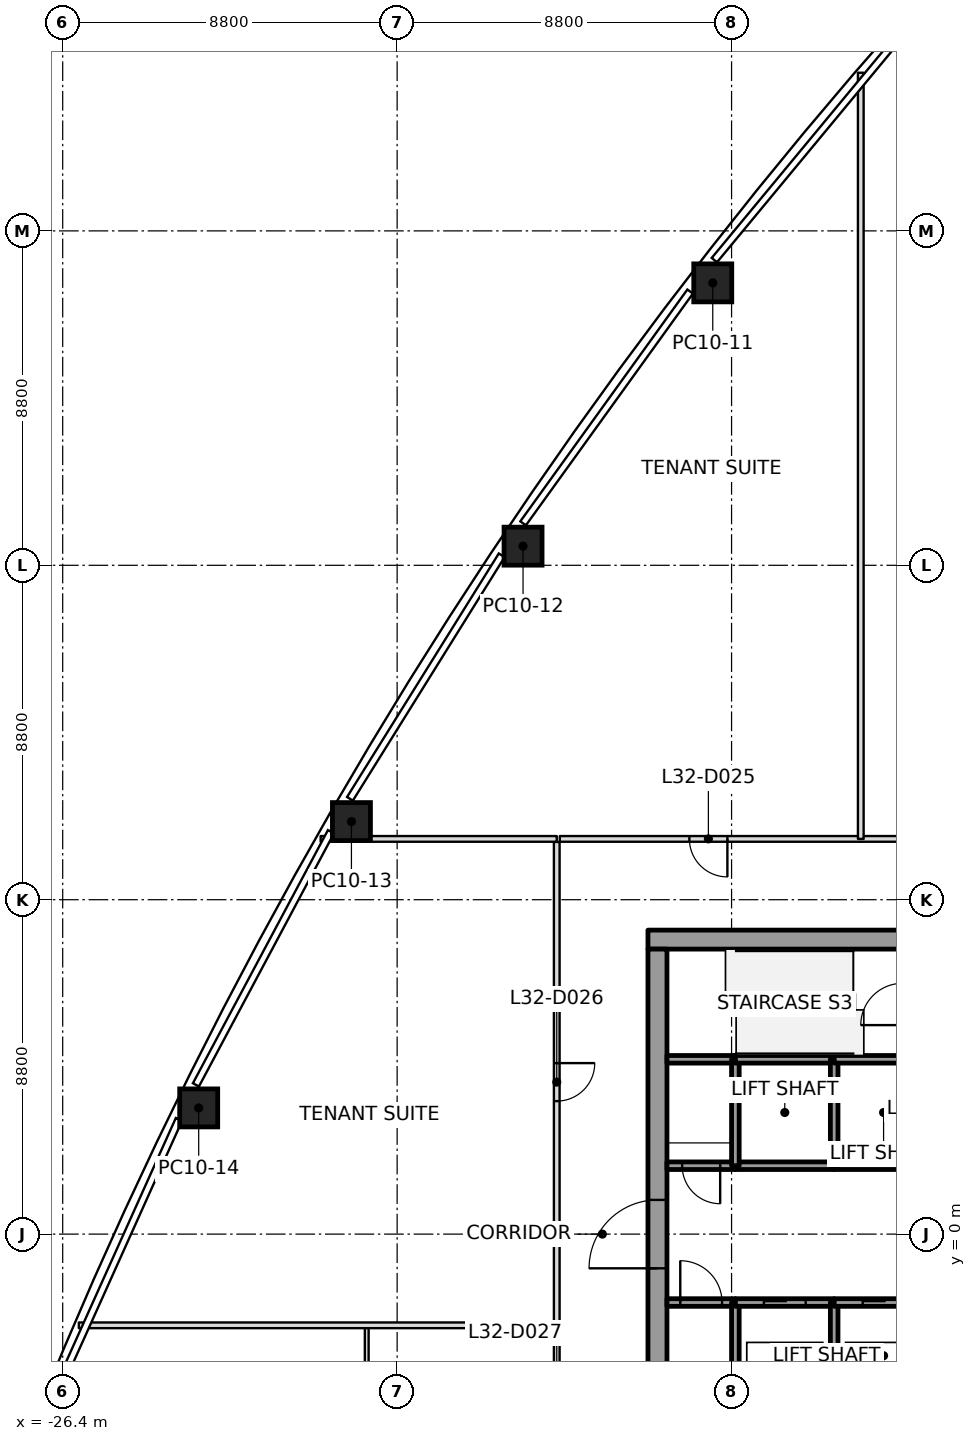
"""IFC4 building model, lengths in metres.
Left out: names, types, materials, properties, quantities, classifications, styles, units other than length and angle.
Written with IfcOpenShell. Run it as: python <this file> out.ifc"""

import sys

from ifc_helpers import new_model, si_unit, direction, frame, frame_2d, origin, origin_2d, place, context, subcontext, project, spatial, rectangle, extrude, element, fill, save


model = new_model("IFC4")
c1 = context("Model", 3, precision=1e-05, world=origin(), true_north=direction((0.0, 1.0)))
c2 = subcontext(c1, "Body", "Model", "MODEL_VIEW")
j1 = project(units=[si_unit("LENGTHUNIT", "METRE"), si_unit("PLANEANGLEUNIT", "RADIAN")], contexts=[c1])
p1 = place(None, origin())
s1 = spatial("IfcSite", under=j1, at=p1, CompositionType="ELEMENT")
p2 = place(p1, origin())
s2 = spatial("IfcBuilding", under=s1, at=p2, CompositionType="ELEMENT")
p3 = place(p2, frame((0.0, 0.0, 149.8)))
s3 = spatial("IfcBuildingStorey", under=s2, at=p3, CompositionType="ELEMENT", Elevation=149.8)
p4 = place(p3, frame((-9.295, 25.032, 0.0), z_axis=(0.000244088989, -0.020564497316, 0.999788498569), x_axis=(0.611500783667, 0.791079555374, 0.016122302675)))
e1 = element("IfcColumn", 1, at=p4, inside=s3, PredefinedType="COLUMN", context=c2, shape_type="SweptSolid", body=[
    extrude(rectangle(XDim=1.0, YDim=1.0, at=origin_2d()), origin(), (0.0, 0.0, 1.0), 4.001),
])
p5 = place(p3, frame((-14.287, 18.104, 0.0), z_axis=(0.005248490815, -0.013243284963, 0.999898529226), x_axis=(0.556999856926, 0.830473325265, 0.008075605706)))
e2 = element("IfcColumn", 2, at=p5, inside=s3, PredefinedType="COLUMN", context=c2, shape_type="SweptSolid", body=[
    extrude(rectangle(XDim=1.0, YDim=1.0, at=origin_2d()), origin(), (0.0, 0.0, 1.0), 4.0),
])
p6 = place(p3, frame((-18.802, 10.856, 0.0), z_axis=(0.009826027463, -0.005675904062, 0.999935614576), x_axis=(0.499975861713, 0.866039339578, 2.779837e-06)))
e3 = element("IfcColumn", 3, at=p6, inside=s3, PredefinedType="COLUMN", context=c2, shape_type="SweptSolid", body=[
    extrude(rectangle(XDim=1.0, YDim=1.0, at=origin_2d()), origin(), (0.0, 0.0, 1.0), 4.0),
])
p7 = place(p3, frame((-22.822, 3.321, 0.0), z_axis=(0.014097689605, 0.002074984617, 0.999898469639), x_axis=(0.440692979973, 0.897621564819, -0.008076123754)))
e4 = element("IfcColumn", 4, at=p7, inside=s3, PredefinedType="COLUMN", context=c2, shape_type="SweptSolid", body=[
    extrude(rectangle(XDim=1.0, YDim=1.0, at=origin_2d()), origin(), (0.0, 0.0, 1.0), 4.0),
])
p8 = place(p3, frame((-11.0, 7.75, 0.0), z_axis=(0.0, 0.0, 1.0), x_axis=(1.0, 0.0, 0.0)))
e5 = element("IfcWall", 5, at=p8, inside=s3, PredefinedType="SHEAR", context=c2, shape_type="SweptSolid", body=[
    extrude(rectangle(XDim=22.0, YDim=0.5, at=frame_2d((11.0, 0.0))), origin(), (0.0, 0.0, 1.0), 4.0),
])
p9 = place(p8, frame((10.45, 0.0, 0.0)))
e6 = element("IfcOpeningElement", 6, at=p9, cuts=e5, PredefinedType="OPENING", context=c2, shape_type="SweptSolid", body=[
    extrude(rectangle(XDim=1.1, YDim=2.1, at=frame_2d((0.55, 1.05))), frame((0.0, 0.25, 0.0), z_axis=(0.0, -1.0, 0.0), x_axis=(1.0, 0.0, 0.0)), (0.0, 0.0, 1.0), 0.5),
])
p10 = place(p3, frame((-10.75, -7.5, 0.0), z_axis=(0.0, 0.0, 1.0), x_axis=(0.0, 1.0, 0.0)))
e7 = element("IfcWall", 7, at=p10, inside=s3, PredefinedType="SHEAR", context=c2, shape_type="SweptSolid", body=[
    extrude(rectangle(XDim=15.0, YDim=0.5, at=frame_2d((7.5, 0.0))), origin(), (0.0, 0.0, 1.0), 4.0),
])
p11 = place(p10, frame((6.6, 0.0, 0.0)))
e8 = element("IfcOpeningElement", 8, at=p11, cuts=e7, PredefinedType="OPENING", context=c2, shape_type="SweptSolid", body=[
    extrude(rectangle(XDim=1.8, YDim=2.1, at=frame_2d((0.9, 1.05))), frame((0.0, 0.25, 0.0), z_axis=(0.0, -1.0, 0.0), x_axis=(1.0, 0.0, 0.0)), (0.0, 0.0, 1.0), 0.5),
])
p12 = place(p3, frame((-10.5, -1.8, 0.0), z_axis=(0.0, 0.0, 1.0), x_axis=(1.0, 0.0, 0.0)))
e9 = element("IfcWall", 9, at=p12, inside=s3, PredefinedType="SOLIDWALL", context=c2, shape_type="SweptSolid", body=[
    extrude(rectangle(XDim=1.8, YDim=0.2, at=frame_2d((0.9, 0.0))), origin(), (0.0, 0.0, 1.0), 3.85),
])
p13 = place(p12, frame((0.35, 0.0, 0.0)))
e10 = element("IfcOpeningElement", 10, at=p13, cuts=e9, PredefinedType="OPENING", context=c2, shape_type="SweptSolid", body=[
    extrude(rectangle(XDim=1.1, YDim=2.1, at=frame_2d((0.55, 1.05))), frame((0.0, 0.1, 0.0), z_axis=(0.0, -1.0, 0.0), x_axis=(1.0, 0.0, 0.0)), (0.0, 0.0, 1.0), 0.2),
])
p14 = place(p3, frame((-8.7, 1.8, 0.0), z_axis=(0.0, 0.0, 1.0), x_axis=(-1.0, 0.0, 0.0)))
e11 = element("IfcWall", 11, at=p14, inside=s3, PredefinedType="SOLIDWALL", context=c2, shape_type="SweptSolid", body=[
    extrude(rectangle(XDim=1.8, YDim=0.2, at=frame_2d((0.9, 0.0))), origin(), (0.0, 0.0, 1.0), 3.85),
])
p15 = place(p14, frame((0.4, 0.0, 0.0)))
e12 = element("IfcOpeningElement", 12, at=p15, cuts=e11, PredefinedType="OPENING", context=c2, shape_type="SweptSolid", body=[
    extrude(rectangle(XDim=1.0, YDim=2.1, at=frame_2d((0.5, 1.05))), frame((0.0, 0.1, 0.0), z_axis=(0.0, -1.0, 0.0), x_axis=(1.0, 0.0, 0.0)), (0.0, 0.0, 1.0), 0.2),
])
p16 = place(p3, frame((-8.7, 4.6, 0.0), z_axis=(0.0, 0.0, 1.0), x_axis=(-1.0, 0.0, 0.0)))
e13 = element("IfcWall", 13, at=p16, inside=s3, PredefinedType="SOLIDWALL", context=c2, shape_type="SweptSolid", body=[
    extrude(rectangle(XDim=1.8, YDim=0.2, at=frame_2d((0.9, 0.0))), origin(), (0.0, 0.0, 1.0), 3.85),
])
p17 = place(p3, frame((-8.7, -4.6, 0.0), z_axis=(0.0, 0.0, 1.0), x_axis=(0.0, 1.0, 0.0)))
e14 = element("IfcWall", 14, at=p17, inside=s3, PredefinedType="SOLIDWALL", context=c2, shape_type="SweptSolid", body=[
    extrude(rectangle(XDim=2.8, YDim=0.2, at=frame_2d((1.4, 0.0))), origin(), (0.0, 0.0, 1.0), 3.85),
])
p18 = place(p3, frame((-8.7, -1.8, 0.0), z_axis=(0.0, 0.0, 1.0), x_axis=(1.0, 0.0, 0.0)))
e15 = element("IfcWall", 15, at=p18, inside=s3, PredefinedType="SOLIDWALL", context=c2, shape_type="SweptSolid", body=[
    extrude(rectangle(XDim=2.6, YDim=0.2, at=frame_2d((1.3, 0.0))), origin(), (0.0, 0.0, 1.0), 3.85),
])
p19 = place(p18, frame((0.75, 0.0, 0.0)))
e16 = element("IfcOpeningElement", 16, at=p19, cuts=e15, PredefinedType="OPENING", context=c2, shape_type="SweptSolid", body=[
    extrude(rectangle(XDim=1.1, YDim=2.1, at=frame_2d((0.55, 1.05))), frame((0.0, 0.1, 0.0), z_axis=(0.0, -1.0, 0.0), x_axis=(1.0, 0.0, 0.0)), (0.0, 0.0, 1.0), 0.2),
])
p20 = place(p3, frame((-6.1, 1.8, 0.0), z_axis=(0.0, 0.0, 1.0), x_axis=(-1.0, 0.0, 0.0)))
e17 = element("IfcWall", 17, at=p20, inside=s3, PredefinedType="SOLIDWALL", context=c2, shape_type="SweptSolid", body=[
    extrude(rectangle(XDim=2.6, YDim=0.2, at=frame_2d((1.3, 0.0))), origin(), (0.0, 0.0, 1.0), 3.85),
])
p21 = place(p3, frame((-8.7, 1.8, 0.0), z_axis=(0.0, 0.0, 1.0), x_axis=(0.0, 1.0, 0.0)))
e18 = element("IfcWall", 18, at=p21, inside=s3, PredefinedType="SOLIDWALL", context=c2, shape_type="SweptSolid", body=[
    extrude(rectangle(XDim=2.8, YDim=0.2, at=frame_2d((1.4, 0.0))), origin(), (0.0, 0.0, 1.0), 3.85),
])
p22 = place(p3, frame((-6.1, 4.6, 0.0), z_axis=(0.0, 0.0, 1.0), x_axis=(-1.0, 0.0, 0.0)))
e19 = element("IfcWall", 19, at=p22, inside=s3, PredefinedType="SOLIDWALL", context=c2, shape_type="SweptSolid", body=[
    extrude(rectangle(XDim=2.6, YDim=0.2, at=frame_2d((1.3, 0.0))), origin(), (0.0, 0.0, 1.0), 3.85),
])
p23 = place(p3, frame((-6.1, -4.6, 0.0), z_axis=(0.0, 0.0, 1.0), x_axis=(0.0, 1.0, 0.0)))
e20 = element("IfcWall", 20, at=p23, inside=s3, PredefinedType="SOLIDWALL", context=c2, shape_type="SweptSolid", body=[
    extrude(rectangle(XDim=2.8, YDim=0.2, at=frame_2d((1.4, 0.0))), origin(), (0.0, 0.0, 1.0), 3.85),
])
p24 = place(p3, frame((-6.1, -1.8, 0.0), z_axis=(0.0, 0.0, 1.0), x_axis=(1.0, 0.0, 0.0)))
e21 = element("IfcWall", 21, at=p24, inside=s3, PredefinedType="SOLIDWALL", context=c2, shape_type="SweptSolid", body=[
    extrude(rectangle(XDim=2.6, YDim=0.2, at=frame_2d((1.3, 0.0))), origin(), (0.0, 0.0, 1.0), 3.85),
])
p25 = place(p24, frame((0.75, 0.0, 0.0)))
e22 = element("IfcOpeningElement", 22, at=p25, cuts=e21, PredefinedType="OPENING", context=c2, shape_type="SweptSolid", body=[
    extrude(rectangle(XDim=1.1, YDim=2.1, at=frame_2d((0.55, 1.05))), frame((0.0, 0.1, 0.0), z_axis=(0.0, -1.0, 0.0), x_axis=(1.0, 0.0, 0.0)), (0.0, 0.0, 1.0), 0.2),
])
p26 = place(p3, frame((-3.5, 1.8, 0.0), z_axis=(0.0, 0.0, 1.0), x_axis=(-1.0, 0.0, 0.0)))
e23 = element("IfcWall", 23, at=p26, inside=s3, PredefinedType="SOLIDWALL", context=c2, shape_type="SweptSolid", body=[
    extrude(rectangle(XDim=2.6, YDim=0.2, at=frame_2d((1.3, 0.0))), origin(), (0.0, 0.0, 1.0), 3.85),
])
p27 = place(p3, frame((-6.1, 1.8, 0.0), z_axis=(0.0, 0.0, 1.0), x_axis=(0.0, 1.0, 0.0)))
e24 = element("IfcWall", 24, at=p27, inside=s3, PredefinedType="SOLIDWALL", context=c2, shape_type="SweptSolid", body=[
    extrude(rectangle(XDim=2.8, YDim=0.2, at=frame_2d((1.4, 0.0))), origin(), (0.0, 0.0, 1.0), 3.85),
])
p28 = place(p3, frame((-4.3, 4.6, 0.0), z_axis=(0.0, 0.0, 1.0), x_axis=(-1.0, 0.0, 0.0)))
e25 = element("IfcWall", 25, at=p28, inside=s3, PredefinedType="SOLIDWALL", context=c2, shape_type="SweptSolid", body=[
    extrude(rectangle(XDim=1.8, YDim=0.2, at=frame_2d((0.9, 0.0))), origin(), (0.0, 0.0, 1.0), 3.85),
])
p29 = place(p3, frame((-13.4, -2.4, 0.0), z_axis=(0.0, 0.0, 1.0), x_axis=(-1.0, 0.0, 0.0)))
e26 = element("IfcWall", 26, at=p29, inside=s3, PredefinedType="PARTITIONING", context=c2, shape_type="SweptSolid", body=[
    extrude(rectangle(XDim=12.576, YDim=0.15, at=frame_2d((6.288, 0.0))), origin(), (0.0, 0.0, 1.0), 3.234),
])
p30 = place(p3, frame((-13.4, 10.4, 0.0), z_axis=(0.0, 0.0, 1.0), x_axis=(-1.0, 0.0, 0.0)))
e27 = element("IfcWall", 27, at=p30, inside=s3, PredefinedType="PARTITIONING", context=c2, shape_type="SweptSolid", body=[
    extrude(rectangle(XDim=6.213, YDim=0.15, at=frame_2d((3.106, 0.0))), origin(), (0.0, 0.0, 1.0), 3.234),
])
p31 = place(p3, frame((-5.4, 10.4, 0.0), z_axis=(0.0, 0.0, 1.0), x_axis=(0.0, 1.0, 0.0)))
e28 = element("IfcWall", 28, at=p31, inside=s3, PredefinedType="PARTITIONING", context=c2, shape_type="SweptSolid", body=[
    extrude(rectangle(XDim=20.162, YDim=0.15, at=frame_2d((10.081, 0.0))), origin(), (0.0, 0.0, 1.0), 3.234),
])
p32 = place(p3, frame((-13.4, 10.32, 0.0), z_axis=(0.0, 0.0, 1.0), x_axis=(0.0, -1.0, 0.0)))
e29 = element("IfcWall", 29, at=p32, inside=s3, PredefinedType="PARTITIONING", context=c2, shape_type="SweptSolid", body=[
    extrude(rectangle(XDim=20.64, YDim=0.15, at=frame_2d((10.32, 0.0))), origin(), (0.0, 0.0, 1.0), 3.166),
])
p33 = place(p32, frame((5.82, 0.0, 0.0)))
e30 = element("IfcOpeningElement", 30, at=p33, cuts=e29, PredefinedType="OPENING", context=c2, shape_type="SweptSolid", body=[
    extrude(rectangle(XDim=1.0, YDim=2.1, at=frame_2d((0.5, 1.05))), frame((0.0, 0.075, 0.0), z_axis=(0.0, -1.0, 0.0), x_axis=(1.0, 0.0, 0.0)), (0.0, 0.0, 1.0), 0.15),
])
p34 = place(p32, frame((14.37, 0.0, 0.0)))
e31 = element("IfcOpeningElement", 31, at=p34, cuts=e29, PredefinedType="OPENING", context=c2, shape_type="SweptSolid", body=[
    extrude(rectangle(XDim=0.9, YDim=2.1, at=frame_2d((0.45, 1.05))), frame((0.0, 0.075, 0.0), z_axis=(0.0, -1.0, 0.0), x_axis=(1.0, 0.0, 0.0)), (0.0, 0.0, 1.0), 0.15),
])
p35 = place(p32, frame((18.38, 0.0, 0.0)))
e32 = element("IfcOpeningElement", 32, at=p35, cuts=e29, PredefinedType="OPENING", context=c2, shape_type="SweptSolid", body=[
    extrude(rectangle(XDim=1.0, YDim=2.1, at=frame_2d((0.5, 1.05))), frame((0.0, 0.075, 0.0), z_axis=(0.0, -1.0, 0.0), x_axis=(1.0, 0.0, 0.0)), (0.0, 0.0, 1.0), 0.15),
])
p36 = place(p3, frame((13.32, 10.4, 0.0), z_axis=(0.0, 0.0, 1.0), x_axis=(-1.0, 0.0, 0.0)))
e33 = element("IfcWall", 33, at=p36, inside=s3, PredefinedType="PARTITIONING", context=c2, shape_type="SweptSolid", body=[
    extrude(rectangle(XDim=26.64, YDim=0.15, at=frame_2d((13.32, 0.0))), origin(), (0.0, 0.0, 1.0), 3.166),
])
p37 = place(p36, frame((1.55, 0.0, 0.0)))
e34 = element("IfcOpeningElement", 34, at=p37, cuts=e33, PredefinedType="OPENING", context=c2, shape_type="SweptSolid", body=[
    extrude(rectangle(XDim=0.9, YDim=2.1, at=frame_2d((0.45, 1.05))), frame((0.0, 0.075, 0.0), z_axis=(0.0, -1.0, 0.0), x_axis=(1.0, 0.0, 0.0)), (0.0, 0.0, 1.0), 0.15),
])
p38 = place(p36, frame((6.96, 0.0, 0.0)))
e35 = element("IfcOpeningElement", 35, at=p38, cuts=e33, PredefinedType="OPENING", context=c2, shape_type="SweptSolid", body=[
    extrude(rectangle(XDim=1.0, YDim=2.1, at=frame_2d((0.5, 1.05))), frame((0.0, 0.075, 0.0), z_axis=(0.0, -1.0, 0.0), x_axis=(1.0, 0.0, 0.0)), (0.0, 0.0, 1.0), 0.15),
])
p39 = place(p36, frame((14.22, 0.0, 0.0)))
e36 = element("IfcOpeningElement", 36, at=p39, cuts=e33, PredefinedType="OPENING", context=c2, shape_type="SweptSolid", body=[
    extrude(rectangle(XDim=1.0, YDim=2.1, at=frame_2d((0.5, 1.05))), frame((0.0, 0.075, 0.0), z_axis=(0.0, -1.0, 0.0), x_axis=(1.0, 0.0, 0.0)), (0.0, 0.0, 1.0), 0.15),
])
p40 = place(p36, frame((22.23, 0.0, 0.0)))
e37 = element("IfcOpeningElement", 37, at=p40, cuts=e33, PredefinedType="OPENING", context=c2, shape_type="SweptSolid", body=[
    extrude(rectangle(XDim=1.0, YDim=2.1, at=frame_2d((0.5, 1.05))), frame((0.0, 0.075, 0.0), z_axis=(0.0, -1.0, 0.0), x_axis=(1.0, 0.0, 0.0)), (0.0, 0.0, 1.0), 0.15),
])
p41 = place(p3, frame((-18.4, -6.6, 0.0), z_axis=(0.0, 0.0, 1.0), x_axis=(0.0, 1.0, 0.0)))
e38 = element("IfcWall", 38, at=p41, inside=s3, PredefinedType="PARTITIONING", context=c2, shape_type="SweptSolid", body=[
    extrude(rectangle(XDim=4.17, YDim=0.1, at=frame_2d((2.085, 0.0))), origin(), (0.0, 0.0, 1.0), 3.247),
])
p42 = place(p40, origin())
e39 = element("IfcDoor", 39, at=p42, inside=s3, OperationType="SINGLE_SWING_RIGHT", PredefinedType="DOOR", context=c2, shape_type="SweptSolid", body=[
    extrude(rectangle(XDim=1.0, YDim=2.1, at=frame_2d((0.5, 1.05))), frame((0.0, 0.025, 0.0), z_axis=(0.0, -1.0, 0.0), x_axis=(1.0, 0.0, 0.0)), (0.0, 0.0, 1.0), 0.05),
])
fill(e37, e39)
p43 = place(p33, origin())
e40 = element("IfcDoor", 40, at=p43, inside=s3, OperationType="SINGLE_SWING_RIGHT", PredefinedType="DOOR", context=c2, shape_type="SweptSolid", body=[
    extrude(rectangle(XDim=1.0, YDim=2.1, at=frame_2d((0.5, 1.05))), frame((0.0, 0.025, 0.0), z_axis=(0.0, -1.0, 0.0), x_axis=(1.0, 0.0, 0.0)), (0.0, 0.0, 1.0), 0.05),
])
fill(e30, e40)
p44 = place(p19, origin())
e41 = element("IfcDoor", 41, at=p44, inside=s3, OperationType="SLIDING_TO_RIGHT", PredefinedType="DOOR", context=c2, shape_type="SweptSolid", body=[
    extrude(rectangle(XDim=1.1, YDim=2.1, at=frame_2d((0.55, 1.05))), frame((0.0, 0.025, 0.0), z_axis=(0.0, -1.0, 0.0), x_axis=(1.0, 0.0, 0.0)), (0.0, 0.0, 1.0), 0.05),
])
fill(e16, e41)
p45 = place(p25, origin())
e42 = element("IfcDoor", 42, at=p45, inside=s3, OperationType="SLIDING_TO_LEFT", PredefinedType="DOOR", context=c2, shape_type="SweptSolid", body=[
    extrude(rectangle(XDim=1.1, YDim=2.1, at=frame_2d((0.55, 1.05))), frame((0.0, 0.025, 0.0), z_axis=(0.0, -1.0, 0.0), x_axis=(1.0, 0.0, 0.0)), (0.0, 0.0, 1.0), 0.05),
])
fill(e22, e42)
p46 = place(p13, origin())
e43 = element("IfcDoor", 43, at=p46, inside=s3, OperationType="SINGLE_SWING_RIGHT", PredefinedType="DOOR", context=c2, shape_type="SweptSolid", body=[
    extrude(rectangle(XDim=1.1, YDim=2.1, at=frame_2d((0.55, 1.05))), frame((0.0, 0.025, 0.0), z_axis=(0.0, -1.0, 0.0), x_axis=(1.0, 0.0, 0.0)), (0.0, 0.0, 1.0), 0.05),
])
fill(e10, e43)
p47 = place(p15, origin())
e44 = element("IfcDoor", 44, at=p47, inside=s3, OperationType="SINGLE_SWING_RIGHT", PredefinedType="DOOR", context=c2, shape_type="SweptSolid", body=[
    extrude(rectangle(XDim=1.0, YDim=2.1, at=frame_2d((0.5, 1.05))), frame((0.0, 0.025, 0.0), z_axis=(0.0, -1.0, 0.0), x_axis=(1.0, 0.0, 0.0)), (0.0, 0.0, 1.0), 0.05),
])
fill(e12, e44)
p48 = place(p11, origin())
e45 = element("IfcDoor", 45, at=p48, inside=s3, OperationType="DOUBLE_DOOR_SINGLE_SWING", PredefinedType="DOOR", context=c2, shape_type="SweptSolid", body=[
    extrude(rectangle(XDim=1.8, YDim=2.1, at=frame_2d((0.9, 1.05))), frame((0.0, 0.025, 0.0), z_axis=(0.0, -1.0, 0.0), x_axis=(1.0, 0.0, 0.0)), (0.0, 0.0, 1.0), 0.05),
])
fill(e8, e45)
save(model, sys.argv[1])
